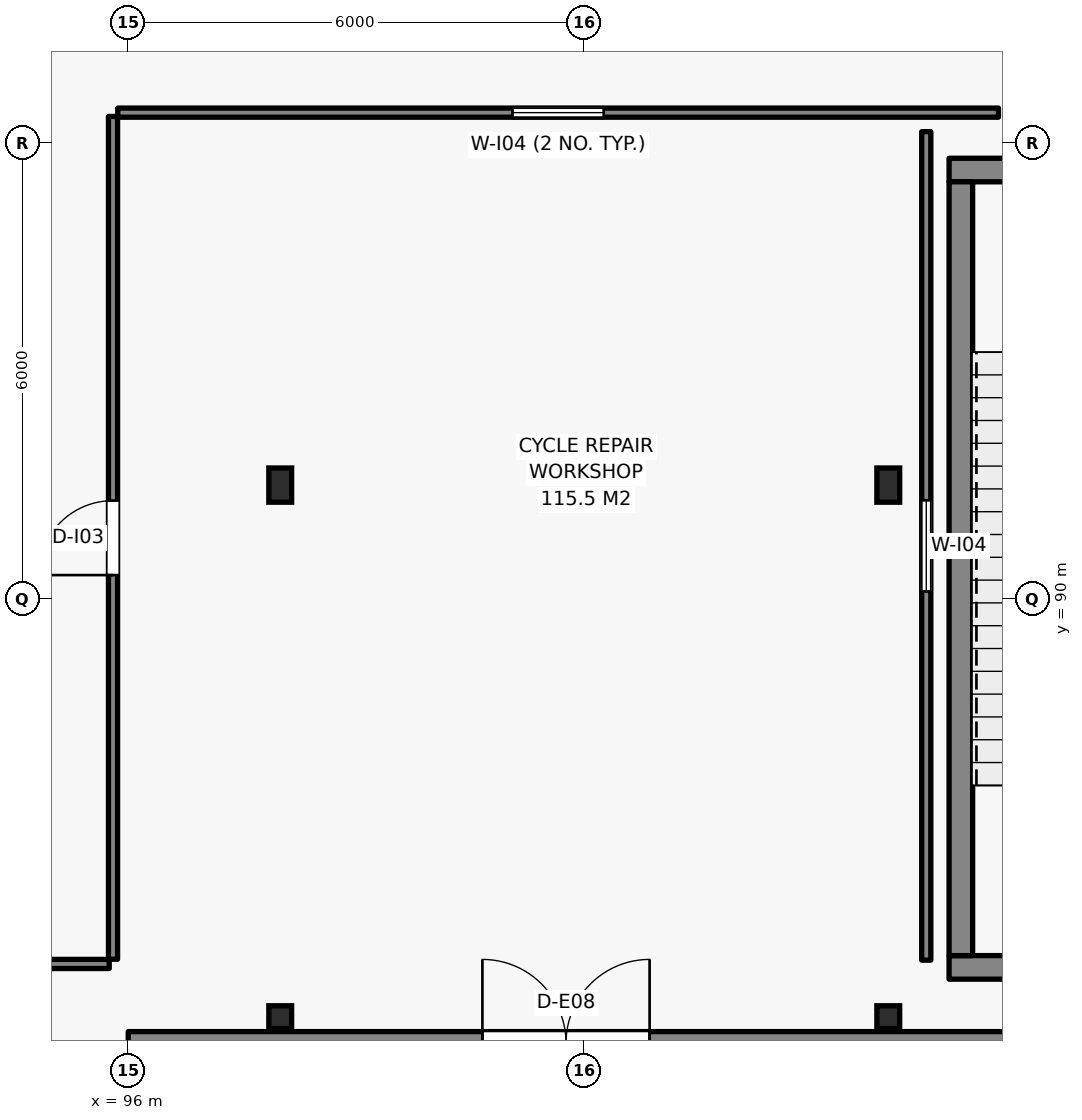
"""IFC4 building model, lengths in metres.
Left out: names, types, materials, properties, quantities, classifications, styles, units other than length and angle.
Written with IfcOpenShell. Run it as: python <this file> out.ifc"""

import sys

from ifc_helpers import new_model, si_unit, direction, frame, frame_2d, origin, origin_2d, place, context, subcontext, project, spatial, rectangle, i_section, extrude, element, fill, save


model = new_model("IFC4")
c1 = context("Model", 3, precision=1e-05, world=origin(), true_north=direction((0.0, 1.0)))
c2 = subcontext(c1, "Body", "Model", "MODEL_VIEW")
j1 = project(units=[si_unit("LENGTHUNIT", "METRE"), si_unit("PLANEANGLEUNIT", "RADIAN")], contexts=[c1])
p1 = place(None, origin())
s1 = spatial("IfcSite", under=j1, at=p1, CompositionType="ELEMENT")
p2 = place(p1, origin())
s2 = spatial("IfcBuilding", under=s1, at=p2, CompositionType="ELEMENT")
p3 = place(p2, origin())
s3 = spatial("IfcBuildingStorey", under=s2, at=p3, CompositionType="ELEMENT", Elevation=0.0)
p4 = place(p3, frame((106.8, 85.155, -0.4), z_axis=(0.0, 0.0, 1.0), x_axis=(1.0, 0.0, 0.0)))
e1 = element("IfcWall", 1, at=p4, inside=s3, PredefinedType="SHEAR", context=c2, shape_type="SweptSolid", body=[
    extrude(rectangle(XDim=5.2, YDim=0.31, at=frame_2d((2.6, 0.0))), origin(), (0.0, 0.0, 1.0), 6.15),
])
p5 = place(p3, frame((106.8, 95.645, -0.4), z_axis=(0.0, 0.0, 1.0), x_axis=(1.0, 0.0, 0.0)))
e2 = element("IfcWall", 2, at=p5, inside=s3, PredefinedType="SHEAR", context=c2, shape_type="SweptSolid", body=[
    extrude(rectangle(XDim=5.2, YDim=0.31, at=frame_2d((2.6, 0.0))), origin(), (0.0, 0.0, 1.0), 6.15),
])
p6 = place(p5, frame((1.7, 0.0, 0.4)))
e3 = element("IfcOpeningElement", 3, at=p6, cuts=e2, PredefinedType="OPENING", context=c2, shape_type="SweptSolid", body=[
    extrude(rectangle(XDim=1.8, YDim=2.15, at=frame_2d((0.9, 1.075))), frame((0.0, 0.165, 0.0), z_axis=(0.0, -1.0, 0.0), x_axis=(1.0, 0.0, 0.0)), (0.0, 0.0, 1.0), 0.33),
])
p7 = place(p3, frame((106.955, 85.31, -0.4), z_axis=(0.0, 0.0, 1.0), x_axis=(0.0, 1.0, 0.0)))
e4 = element("IfcWall", 4, at=p7, inside=s3, PredefinedType="SHEAR", context=c2, shape_type="SweptSolid", body=[
    extrude(rectangle(XDim=10.18, YDim=0.31, at=frame_2d((5.09, 0.0))), origin(), (0.0, 0.0, 1.0), 6.15),
])
p8 = place(p3, frame((98.0, 84.5, -0.4), z_axis=(0.0, 0.0, 1.0), x_axis=(1.0, 0.0, 0.0)))
e5 = element("IfcColumn", 5, at=p8, inside=s3, PredefinedType="PILASTER", context=c2, shape_type="SweptSolid", body=[
    extrude(i_section(OverallWidth=0.3, OverallDepth=0.3, WebThickness=0.011, FlangeThickness=0.019, FilletRadius=0.027, at=origin_2d()), origin(), (0.0, 0.0, 1.0), 6.4),
])
p9 = place(p3, frame((98.0, 91.5, -0.4), z_axis=(0.0, 0.0, 1.0), x_axis=(1.0, 0.0, 0.0)))
e6 = element("IfcColumn", 6, at=p9, inside=s3, PredefinedType="COLUMN", context=c2, shape_type="SweptSolid", body=[
    extrude(i_section(OverallWidth=0.3, OverallDepth=0.45, WebThickness=0.014, FlangeThickness=0.026, FilletRadius=0.027, at=origin_2d()), origin(), (0.0, 0.0, 1.0), 6.4),
])
p10 = place(p3, frame((106.0, 84.5, -0.4), z_axis=(0.0, 0.0, 1.0), x_axis=(1.0, 0.0, 0.0)))
e7 = element("IfcColumn", 7, at=p10, inside=s3, PredefinedType="PILASTER", context=c2, shape_type="SweptSolid", body=[
    extrude(i_section(OverallWidth=0.3, OverallDepth=0.3, WebThickness=0.011, FlangeThickness=0.019, FilletRadius=0.027, at=origin_2d()), origin(), (0.0, 0.0, 1.0), 6.4),
])
p11 = place(p3, frame((106.0, 91.5, -0.4), z_axis=(0.0, 0.0, 1.0), x_axis=(1.0, 0.0, 0.0)))
e8 = element("IfcColumn", 8, at=p11, inside=s3, PredefinedType="COLUMN", context=c2, shape_type="SweptSolid", body=[
    extrude(i_section(OverallWidth=0.3, OverallDepth=0.45, WebThickness=0.014, FlangeThickness=0.026, FilletRadius=0.027, at=origin_2d()), origin(), (0.0, 0.0, 1.0), 6.4),
])
p12 = place(p3, frame((96.0, 84.16, 0.0), z_axis=(0.0, 0.0, 1.0), x_axis=(1.0, 0.0, 0.0)))
e9 = element("IfcWall", 9, at=p12, inside=s3, PredefinedType="SOLIDWALL", context=c2, shape_type="SweptSolid", body=[
    extrude(rectangle(XDim=18.0, YDim=0.3, at=frame_2d((9.0, 0.0))), origin(), (0.0, 0.0, 1.0), 5.74),
])
p13 = place(p12, frame((4.66, 0.0, 0.0)))
e10 = element("IfcOpeningElement", 10, at=p13, cuts=e9, PredefinedType="OPENING", context=c2, shape_type="SweptSolid", body=[
    extrude(rectangle(XDim=2.2, YDim=2.45, at=frame_2d((1.1, 1.225))), frame((0.0, 0.16, 0.0), z_axis=(0.0, -1.0, 0.0), x_axis=(1.0, 0.0, 0.0)), (0.0, 0.0, 1.0), 0.32),
])
p14 = place(p12, frame((14.75, 0.0, 0.9)))
e11 = element("IfcOpeningElement", 11, at=p14, cuts=e9, PredefinedType="OPENING", context=c2, shape_type="SweptSolid", body=[
    extrude(rectangle(XDim=2.0, YDim=2.2, at=frame_2d((1.0, 1.1))), frame((0.0, 0.16, 0.0), z_axis=(0.0, -1.0, 0.0), x_axis=(1.0, 0.0, 0.0)), (0.0, 0.0, 1.0), 0.32),
])
p15 = place(p3, frame((83.05, 85.2, 0.0), z_axis=(0.0, 0.0, 1.0), x_axis=(1.0, 0.0, 0.0)))
e12 = element("IfcWall", 12, at=p15, inside=s3, PredefinedType="PARTITIONING", context=c2, shape_type="SweptSolid", body=[
    extrude(rectangle(XDim=12.7, YDim=0.12, at=frame_2d((6.35, 0.0))), origin(), (0.0, 0.0, 1.0), 5.335),
])
p16 = place(p15, frame((5.35, 0.0, 1.05)))
e13 = element("IfcOpeningElement", 13, at=p16, cuts=e12, PredefinedType="OPENING", context=c2, shape_type="SweptSolid", body=[
    extrude(rectangle(XDim=2.0, YDim=1.2, at=frame_2d((1.0, 0.6))), frame((0.0, 0.07, 0.0), z_axis=(0.0, -1.0, 0.0), x_axis=(1.0, 0.0, 0.0)), (0.0, 0.0, 1.0), 0.14),
])
p17 = place(p3, frame((95.8, 85.262, 0.0), z_axis=(0.0, 0.0, 1.0), x_axis=(0.0, 1.0, 0.0)))
e14 = element("IfcWall", 14, at=p17, inside=s3, PredefinedType="PARTITIONING", context=c2, shape_type="SweptSolid", body=[
    extrude(rectangle(XDim=11.088, YDim=0.12, at=frame_2d((5.544, 0.0))), origin(), (0.0, 0.0, 1.0), 5.285),
])
p18 = place(p17, frame((5.054, 0.0, 0.0)))
e15 = element("IfcOpeningElement", 15, at=p18, cuts=e14, PredefinedType="OPENING", context=c2, shape_type="SweptSolid", body=[
    extrude(rectangle(XDim=0.98, YDim=2.15, at=frame_2d((0.49, 1.075))), frame((0.0, 0.07, 0.0), z_axis=(0.0, -1.0, 0.0), x_axis=(1.0, 0.0, 0.0)), (0.0, 0.0, 1.0), 0.14),
])
p19 = place(p3, frame((95.862, 96.4, 0.0), z_axis=(0.0, 0.0, 1.0), x_axis=(1.0, 0.0, 0.0)))
e16 = element("IfcWall", 16, at=p19, inside=s3, PredefinedType="PARTITIONING", context=c2, shape_type="SweptSolid", body=[
    extrude(rectangle(XDim=11.588, YDim=0.12, at=frame_2d((5.794, 0.0))), origin(), (0.0, 0.0, 1.0), 5.325),
])
p20 = place(p19, frame((5.194, 0.0, 1.05)))
e17 = element("IfcOpeningElement", 17, at=p20, cuts=e16, PredefinedType="OPENING", context=c2, shape_type="SweptSolid", body=[
    extrude(rectangle(XDim=1.2, YDim=1.1, at=frame_2d((0.6, 0.55))), frame((0.0, 0.07, 0.0), z_axis=(0.0, -1.0, 0.0), x_axis=(1.0, 0.0, 0.0)), (0.0, 0.0, 1.0), 0.14),
])
p21 = place(p3, frame((106.5, 85.25, 0.0), z_axis=(0.0, 0.0, 1.0), x_axis=(0.0, 1.0, 0.0)))
e18 = element("IfcWall", 18, at=p21, inside=s3, PredefinedType="PARTITIONING", context=c2, shape_type="SweptSolid", body=[
    extrude(rectangle(XDim=10.9, YDim=0.12, at=frame_2d((5.45, 0.0))), origin(), (0.0, 0.0, 1.0), 5.365),
])
p22 = place(p21, frame((4.85, 0.0, 1.05)))
e19 = element("IfcOpeningElement", 19, at=p22, cuts=e18, PredefinedType="OPENING", context=c2, shape_type="SweptSolid", body=[
    extrude(rectangle(XDim=1.2, YDim=1.1, at=frame_2d((0.6, 0.55))), frame((0.0, 0.07, 0.0), z_axis=(0.0, -1.0, 0.0), x_axis=(1.0, 0.0, 0.0)), (0.0, 0.0, 1.0), 0.14),
])
p23 = place(p18, origin())
e20 = element("IfcDoor", 20, at=p23, inside=s3, OperationType="SINGLE_SWING_LEFT", PredefinedType="DOOR", context=c2, shape_type="SweptSolid", body=[
    extrude(rectangle(XDim=0.98, YDim=2.15, at=frame_2d((0.49, 1.075))), frame((0.0, 0.025, 0.0), z_axis=(0.0, -1.0, 0.0), x_axis=(1.0, 0.0, 0.0)), (0.0, 0.0, 1.0), 0.05),
])
fill(e15, e20)
p24 = place(p20, origin())
e21 = element("IfcWindow", 21, at=p24, inside=s3, PartitioningType="SINGLE_PANEL", PredefinedType="WINDOW", context=c2, shape_type="SweptSolid", body=[
    extrude(rectangle(XDim=1.2, YDim=1.1, at=frame_2d((0.6, 0.55))), frame((0.0, 0.03, 0.0), z_axis=(0.0, -1.0, 0.0), x_axis=(1.0, 0.0, 0.0)), (0.0, 0.0, 1.0), 0.06),
])
fill(e17, e21)
p25 = place(p22, origin())
e22 = element("IfcWindow", 22, at=p25, inside=s3, PartitioningType="SINGLE_PANEL", PredefinedType="WINDOW", context=c2, shape_type="SweptSolid", body=[
    extrude(rectangle(XDim=1.2, YDim=1.1, at=frame_2d((0.6, 0.55))), frame((0.0, 0.03, 0.0), z_axis=(0.0, -1.0, 0.0), x_axis=(1.0, 0.0, 0.0)), (0.0, 0.0, 1.0), 0.06),
])
fill(e19, e22)
save(model, sys.argv[1])
